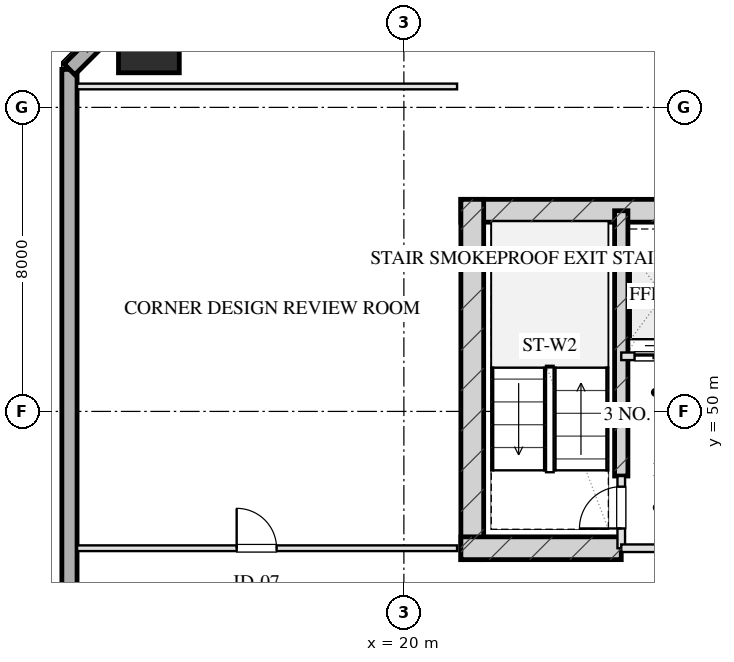
"""IFC4 building model, lengths in metres.
Left out: names, types, materials, properties, quantities, classifications, styles, units other than length and angle.
Written with IfcOpenShell. Run it as: python <this file> out.ifc"""

import sys

from ifc_helpers import new_model, si_unit, direction, frame, frame_2d, origin, origin_2d, place, context, subcontext, project, spatial, rectangle, hollow_rectangle, extrude, element, fill, save


model = new_model("IFC4")
c1 = context("Model", 3, precision=1e-05, world=origin(), true_north=direction((0.0, 1.0)))
c2 = subcontext(c1, "Body", "Model", "MODEL_VIEW")
j1 = project(units=[si_unit("LENGTHUNIT", "METRE"), si_unit("PLANEANGLEUNIT", "RADIAN")], contexts=[c1])
p1 = place(None, origin())
s1 = spatial("IfcSite", under=j1, at=p1, CompositionType="ELEMENT")
p2 = place(p1, origin())
s2 = spatial("IfcBuilding", under=s1, at=p2, CompositionType="ELEMENT")
p3 = place(p2, frame((0.0, 0.0, 146.05)))
s3 = spatial("IfcBuildingStorey", under=s2, at=p3, CompositionType="ELEMENT", Elevation=146.05)
p4 = place(p3, frame((21.5, 55.28, 0.0), z_axis=(0.0, 0.0, 1.0), x_axis=(1.0, 0.0, 0.0)))
e1 = element("IfcWall", 1, at=p4, inside=s3, PredefinedType="SHEAR", context=c2, shape_type="SweptSolid", body=[
    extrude(rectangle(XDim=17.0, YDim=0.6, at=frame_2d((8.5, 0.0))), origin(), (0.0, 0.0, 1.0), 3.45),
])
p5 = place(p3, frame((21.8, 46.1, 0.0), z_axis=(0.0, 0.0, 1.0), x_axis=(0.0, 1.0, 0.0)))
e2 = element("IfcWall", 2, at=p5, inside=s3, PredefinedType="SHEAR", context=c2, shape_type="SweptSolid", body=[
    extrude(rectangle(XDim=9.48, YDim=0.6, at=frame_2d((4.74, 0.0))), origin(), (0.0, 0.0, 1.0), 3.45),
])
p6 = place(p3, frame((25.72, 48.3, 0.0), z_axis=(0.0, 0.0, 1.0), x_axis=(0.0, 1.0, 0.0)))
e3 = element("IfcWall", 3, at=p6, inside=s3, PredefinedType="SHEAR", context=c2, shape_type="SweptSolid", body=[
    extrude(rectangle(XDim=6.98, YDim=0.35, at=frame_2d((3.49, 0.0))), origin(), (0.0, 0.0, 1.0), 3.45),
])
p7 = place(p3, frame((21.5, 46.4, 0.0), z_axis=(0.0, 0.0, 1.0), x_axis=(1.0, 0.0, 0.0)))
e4 = element("IfcWall", 4, at=p7, inside=s3, PredefinedType="SHEAR", context=c2, shape_type="SweptSolid", body=[
    extrude(rectangle(XDim=4.22, YDim=0.6, at=frame_2d((2.11, 0.0))), origin(), (0.0, 0.0, 1.0), 3.45),
])
p8 = place(p3, frame((13.29, 59.71, 0.0), z_axis=(0.0, 0.0, 1.0), x_axis=(1.0, 0.0, 0.0)))
e5 = element("IfcColumn", 5, at=p8, inside=s3, PredefinedType="COLUMN", context=c2, shape_type="SweptSolid", body=[
    extrude(hollow_rectangle(XDim=1.6, YDim=1.6, WallThickness=0.055, at=origin_2d()), origin(), (0.0, 0.0, 1.0), 3.451),
])
p9 = place(p3, frame((11.2, 9.0, 0.0), z_axis=(0.0, 0.0, 1.0), x_axis=(0.0, 1.0, 0.0)))
e6 = element("IfcWall", 6, at=p9, inside=s3, PredefinedType="SOLIDWALL", context=c2, shape_type="SweptSolid", body=[
    extrude(rectangle(XDim=50.0, YDim=0.4, at=frame_2d((25.0, 0.0))), origin(), (0.0, 0.0, 1.0), 2.61),
])
p10 = place(p9, frame((20.05, 0.0, 0.0)))
e7 = element("IfcOpeningElement", 7, at=p10, cuts=e6, PredefinedType="OPENING", context=c2, shape_type="SweptSolid", body=[
    extrude(rectangle(XDim=1.1, YDim=2.15, at=frame_2d((0.55, 1.075))), frame((0.0, 0.21, 0.0), z_axis=(0.0, -1.0, 0.0), x_axis=(1.0, 0.0, 0.0)), (0.0, 0.0, 1.0), 0.42),
])
p11 = place(p3, frame((11.2, 59.0, 0.0), z_axis=(0.0, 0.0, 1.0), x_axis=(0.707106781187, 0.707106781187, 0.0)))
e8 = element("IfcWall", 8, at=p11, inside=s3, PredefinedType="SOLIDWALL", context=c2, shape_type="SweptSolid", body=[
    extrude(rectangle(XDim=3.96, YDim=0.4, at=frame_2d((1.98, 0.0))), origin(), (0.0, 0.0, 1.0), 2.61),
])
p12 = place(p3, frame((25.72, 46.4, 0.0), z_axis=(0.0, 0.0, 1.0), x_axis=(0.0, 1.0, 0.0)))
e9 = element("IfcWall", 9, at=p12, inside=s3, PredefinedType="PARTITIONING", context=c2, shape_type="SweptSolid", body=[
    extrude(rectangle(XDim=1.9, YDim=0.2, at=frame_2d((0.95, 0.0))), origin(), (0.0, 0.0, 1.0), 3.175),
])
p13 = place(p12, frame((0.52, 0.0, 0.0)))
e10 = element("IfcOpeningElement", 10, at=p13, cuts=e9, PredefinedType="OPENING", context=c2, shape_type="SweptSolid", body=[
    extrude(rectangle(XDim=1.1, YDim=2.05, at=frame_2d((0.55, 1.025))), frame((0.0, 0.11, 0.0), z_axis=(0.0, -1.0, 0.0), x_axis=(1.0, 0.0, 0.0)), (0.0, 0.0, 1.0), 0.22),
])
p14 = place(p3, frame((25.72, 46.4, 0.0), z_axis=(0.0, 0.0, 1.0), x_axis=(1.0, 0.0, 0.0)))
e11 = element("IfcWall", 11, at=p14, inside=s3, PredefinedType="PARTITIONING", context=c2, shape_type="SweptSolid", body=[
    extrude(rectangle(XDim=3.83, YDim=0.2, at=frame_2d((1.915, 0.0))), origin(), (0.0, 0.0, 1.0), 3.175),
])
p15 = place(p14, frame((1.35, 0.0, 0.0)))
e12 = element("IfcOpeningElement", 12, at=p15, cuts=e11, PredefinedType="OPENING", context=c2, shape_type="SweptSolid", body=[
    extrude(rectangle(XDim=1.2, YDim=2.05, at=frame_2d((0.6, 1.025))), frame((0.0, 0.11, 0.0), z_axis=(0.0, -1.0, 0.0), x_axis=(1.0, 0.0, 0.0)), (0.0, 0.0, 1.0), 0.22),
])
p16 = place(p3, frame((25.72, 51.45, 0.0), z_axis=(0.0, 0.0, 1.0), x_axis=(1.0, 0.0, 0.0)))
e13 = element("IfcWall", 13, at=p16, inside=s3, PredefinedType="PARTITIONING", context=c2, shape_type="SweptSolid", body=[
    extrude(rectangle(XDim=2.1, YDim=0.2, at=frame_2d((1.05, 0.0))), origin(), (0.0, 0.0, 1.0), 3.175),
])
p17 = place(p16, frame((0.35, 0.0, 0.0)))
e14 = element("IfcOpeningElement", 14, at=p17, cuts=e13, PredefinedType="OPENING", context=c2, shape_type="SweptSolid", body=[
    extrude(rectangle(XDim=1.1, YDim=2.05, at=frame_2d((0.55, 1.025))), frame((0.0, 0.11, 0.0), z_axis=(0.0, -1.0, 0.0), x_axis=(1.0, 0.0, 0.0)), (0.0, 0.0, 1.0), 0.22),
])
p18 = place(p3, frame((11.4, 58.55, 0.0), z_axis=(0.0, 0.0, 1.0), x_axis=(1.0, 0.0, 0.0)))
e15 = element("IfcWall", 15, at=p18, inside=s3, PredefinedType="PARTITIONING", context=c2, shape_type="SweptSolid", body=[
    extrude(rectangle(XDim=10.0, YDim=0.15, at=frame_2d((5.0, 0.0))), origin(), (0.0, 0.0, 1.0), 3.175),
])
p19 = place(p3, frame((11.4, 46.4, 0.0), z_axis=(0.0, 0.0, 1.0), x_axis=(1.0, 0.0, 0.0)))
e16 = element("IfcWall", 16, at=p19, inside=s3, PredefinedType="PARTITIONING", context=c2, shape_type="SweptSolid", body=[
    extrude(rectangle(XDim=10.0, YDim=0.15, at=frame_2d((5.0, 0.0))), origin(), (0.0, 0.0, 1.0), 3.175),
])
p20 = place(p19, frame((4.2, 0.0, 0.0)))
e17 = element("IfcOpeningElement", 17, at=p20, cuts=e16, PredefinedType="OPENING", context=c2, shape_type="SweptSolid", body=[
    extrude(rectangle(XDim=1.05, YDim=2.05, at=frame_2d((0.525, 1.025))), frame((0.0, 0.085, 0.0), z_axis=(0.0, -1.0, 0.0), x_axis=(1.0, 0.0, 0.0)), (0.0, 0.0, 1.0), 0.17),
])
p21 = place(p13, origin())
e18 = element("IfcDoor", 18, at=p21, inside=s3, OperationType="SINGLE_SWING_LEFT", PredefinedType="DOOR", context=c2, shape_type="SweptSolid", body=[
    extrude(rectangle(XDim=1.1, YDim=2.05, at=frame_2d((0.55, 1.025))), frame((0.0, 0.025, 0.0), z_axis=(0.0, -1.0, 0.0), x_axis=(1.0, 0.0, 0.0)), (0.0, 0.0, 1.0), 0.05),
])
fill(e10, e18)
p22 = place(p17, origin())
e19 = element("IfcDoor", 19, at=p22, inside=s3, OperationType="DOUBLE_DOOR_SLIDING", PredefinedType="DOOR", context=c2, shape_type="SweptSolid", body=[
    extrude(rectangle(XDim=1.1, YDim=2.05, at=frame_2d((0.55, 1.025))), frame((0.0, 0.025, 0.0), z_axis=(0.0, -1.0, 0.0), x_axis=(1.0, 0.0, 0.0)), (0.0, 0.0, 1.0), 0.05),
])
fill(e14, e19)
p23 = place(p20, origin())
e20 = element("IfcDoor", 20, at=p23, inside=s3, OperationType="SINGLE_SWING_LEFT", PredefinedType="DOOR", context=c2, shape_type="SweptSolid", body=[
    extrude(rectangle(XDim=1.05, YDim=2.05, at=frame_2d((0.525, 1.025))), frame((0.0, 0.025, 0.0), z_axis=(0.0, -1.0, 0.0), x_axis=(1.0, 0.0, 0.0)), (0.0, 0.0, 1.0), 0.05),
])
fill(e17, e20)
save(model, sys.argv[1])
